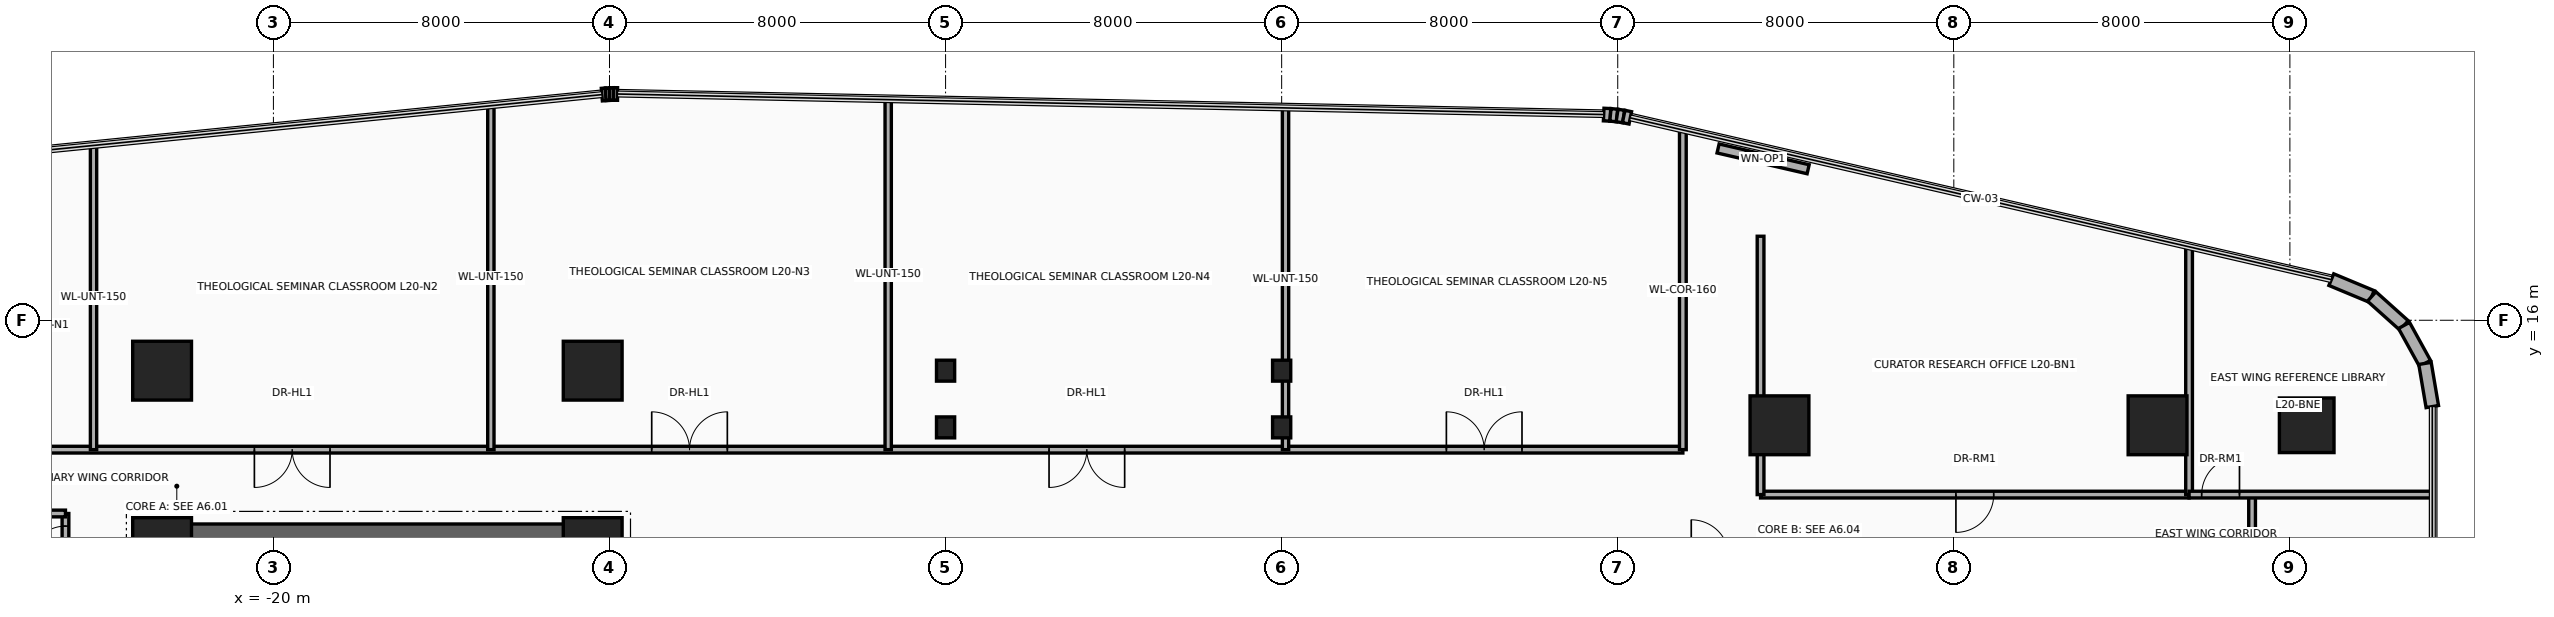
"""IFC4 building model, lengths in metres.
Left out: names, types, materials, properties, quantities, classifications, styles, units other than length and angle.
Written with IfcOpenShell. Run it as: python <this file> out.ifc"""

import sys

from ifc_helpers import new_model, si_unit, direction, frame, frame_2d, origin, origin_2d, place, context, subcontext, project, spatial, rectangle, circle, i_section, extrude, source, transform, mapped, element, fill, save


model = new_model("IFC4")
c1 = context("Model", 3, precision=1e-05, world=origin(), true_north=direction((0.0, 1.0)))
c2 = subcontext(c1, "Body", "Model", "MODEL_VIEW")
j1 = project(units=[si_unit("LENGTHUNIT", "METRE"), si_unit("PLANEANGLEUNIT", "RADIAN")], contexts=[c1])
p1 = place(None, origin())
s1 = spatial("IfcSite", under=j1, at=p1, CompositionType="ELEMENT")
p2 = place(p1, origin())
s2 = spatial("IfcBuilding", under=s1, at=p2, CompositionType="ELEMENT")
p3 = place(p2, frame((0.0, 0.0, 81.5)))
s3 = spatial("IfcBuildingStorey", under=s2, at=p3, CompositionType="ELEMENT", Elevation=81.5)
p4 = place(p3, frame((-22.65, -11.15, 0.0), z_axis=(0.0, 0.0, 1.0), x_axis=(0.0, 1.0, 0.0)))
e1 = element("IfcWall", 1, at=p4, inside=s3, PredefinedType="SHEAR", context=c2, shape_type="SweptSolid", body=[
    extrude(rectangle(XDim=22.3, YDim=0.7, at=frame_2d((11.15, 0.0))), origin(), (0.0, 0.0, 1.0), 3.46),
])
p5 = place(p3, frame((-22.65, 10.8, 0.0), z_axis=(0.0, 0.0, 1.0), x_axis=(1.0, 0.0, 0.0)))
e2 = element("IfcWall", 2, at=p5, inside=s3, PredefinedType="SHEAR", context=c2, shape_type="SweptSolid", body=[
    extrude(rectangle(XDim=10.25, YDim=0.7, at=frame_2d((5.125, 0.0))), origin(), (0.0, 0.0, 1.0), 3.46),
])
m1 = source(origin(), c2, "Body", "SweptSolid", [
    extrude(rectangle(XDim=1.4, YDim=1.4, at=origin_2d()), origin(), (0.0, 0.0, 1.0), 3.7),
])
for number, where, z_axis, x_axis in (
    (3, (-22.65, 10.6, 0.0), (0.0, 0.0, 1.0), (1.0, 0.0, 0.0)),
    (4, (-12.4, 10.6, 0.0), (0.0, 0.0, 1.0), (1.0, 0.0, 0.0)),
    (5, (-22.65, 14.8, 0.0), (0.0, 0.0, 1.0), (1.0, 0.0, 0.0)),
    (6, (-12.4, 14.8, 0.0), (0.0, 0.0, 1.0), (1.0, 0.0, 0.0)),
    (7, (15.85, 13.5, 0.0), (0.0, 0.0, 1.0), (1.0, 0.0, 0.0)),
    (8, (24.85, 13.5, 0.0), (0.0, 0.0, 1.0), (1.0, 0.0, 0.0)),
):
    element("IfcColumn", number, at=place(p3, frame(where, z_axis=z_axis, x_axis=x_axis)), inside=s3, PredefinedType="COLUMN", context=c2, shape_type="MappedRepresentation", body=[
        mapped(m1, transform((0.0, 0.0, 0.0), x_axis=(1.0, 0.0, 0.0), y_axis=(0.0, 1.0, 0.0), z_axis=(0.0, 0.0, 1.0), scale=1.0)),
    ])
m2 = source(origin(), c2, "Body", "SweptSolid", [
    extrude(circle(Radius=0.65, at=origin_2d()), origin(), (0.0, 0.0, 1.0), 3.7),
])
p6 = place(p3, frame((28.4, 13.5, 0.0), z_axis=(0.0, 0.0, 1.0), x_axis=(1.0, 0.0, 0.0)))
e9 = element("IfcColumn", 9, at=p6, inside=s3, PredefinedType="COLUMN", context=c2, shape_type="MappedRepresentation", body=[
    mapped(m2, transform((0.0, 0.0, 0.0), x_axis=(1.0, 0.0, 0.0), y_axis=(0.0, 1.0, 0.0), z_axis=(0.0, 0.0, 1.0), scale=1.0)),
])
m3 = source(origin(), c2, "Body", "SweptSolid", [
    extrude(i_section(OverallWidth=0.432, OverallDepth=0.498, WebThickness=0.056, FlangeThickness=0.089, at=origin_2d()), origin(), (0.0, 0.0, 1.0), 3.7),
])
for number, where, z_axis, x_axis in (
    (10, (-4.0, 13.45, 0.0), (0.0, 0.0, 1.0), (1.0, 0.0, 0.0)),
    (11, (-4.0, 14.8, 0.0), (0.0, 0.0, 1.0), (1.0, 0.0, 0.0)),
    (12, (4.0, 13.45, 0.0), (0.0, 0.0, 1.0), (1.0, 0.0, 0.0)),
    (13, (4.0, 14.8, 0.0), (0.0, 0.0, 1.0), (1.0, 0.0, 0.0)),
):
    element("IfcColumn", number, at=place(p3, frame(where, z_axis=z_axis, x_axis=x_axis)), inside=s3, PredefinedType="COLUMN", context=c2, shape_type="MappedRepresentation", body=[
        mapped(m3, transform((0.0, 0.0, 0.0), x_axis=(1.0, 0.0, 0.0), y_axis=(0.0, 1.0, 0.0), z_axis=(0.0, 0.0, 1.0), scale=1.0)),
    ])
p7 = place(p3, frame((-12.182, 21.371, 0.0), z_axis=(0.0, 0.0, 1.0), x_axis=(0.996527790842, 0.08326080759, 0.0)))
e14 = element("IfcWall", 14, at=p7, inside=s3, PredefinedType="SOLIDWALL", context=c2, shape_type="SweptSolid", body=[
    extrude(rectangle(XDim=0.094, YDim=0.3, at=frame_2d((0.047, 0.0))), origin(), (0.0, 0.0, 1.0), 3.46),
])
p8 = place(p3, frame((-12.088, 21.379, 0.0), z_axis=(0.0, 0.0, 1.0), x_axis=(0.998476480444, 0.055178963393, 0.0)))
e15 = element("IfcWall", 15, at=p8, inside=s3, PredefinedType="SOLIDWALL", context=c2, shape_type="SweptSolid", body=[
    extrude(rectangle(XDim=0.093, YDim=0.3, at=frame_2d((0.046, 0.0))), origin(), (0.0, 0.0, 1.0), 3.46),
])
p9 = place(p3, frame((-11.996, 21.384, 0.0), z_axis=(0.0, 0.0, 1.0), x_axis=(0.999722573757, 0.023553673204, 0.0)))
e16 = element("IfcWall", 16, at=p9, inside=s3, PredefinedType="SOLIDWALL", context=c2, shape_type="SweptSolid", body=[
    extrude(rectangle(XDim=0.093, YDim=0.3, at=frame_2d((0.047, 0.0))), origin(), (0.0, 0.0, 1.0), 3.46),
])
p10 = place(p3, frame((-11.902, 21.386, 0.0), z_axis=(0.0, 0.0, 1.0), x_axis=(0.999986507273, -0.005194735103, 0.0)))
e17 = element("IfcWall", 17, at=p10, inside=s3, PredefinedType="SOLIDWALL", context=c2, shape_type="SweptSolid", body=[
    extrude(rectangle(XDim=0.094, YDim=0.3, at=frame_2d((0.047, 0.0))), origin(), (0.0, 0.0, 1.0), 3.46),
])
p11 = place(p3, frame((11.666, 20.897, 0.0), z_axis=(0.0, 0.0, 1.0), x_axis=(0.998885297239, -0.047203421059, 0.0)))
e18 = element("IfcWall", 18, at=p11, inside=s3, PredefinedType="SOLIDWALL", context=c2, shape_type="SweptSolid", body=[
    extrude(rectangle(XDim=0.16, YDim=0.3, at=frame_2d((0.08, 0.0))), origin(), (0.0, 0.0, 1.0), 3.46),
])
p12 = place(p3, frame((11.826, 20.889, 0.0), z_axis=(0.0, 0.0, 1.0), x_axis=(0.995172891136, -0.098137234257, 0.0)))
e19 = element("IfcWall", 19, at=p12, inside=s3, PredefinedType="SOLIDWALL", context=c2, shape_type="SweptSolid", body=[
    extrude(rectangle(XDim=0.159, YDim=0.3, at=frame_2d((0.08, 0.0))), origin(), (0.0, 0.0, 1.0), 3.46),
])
p13 = place(p3, frame((11.984, 20.874, 0.0), z_axis=(0.0, 0.0, 1.0), x_axis=(0.988846069207, -0.148941100486, 0.0)))
e20 = element("IfcWall", 20, at=p13, inside=s3, PredefinedType="SOLIDWALL", context=c2, shape_type="SweptSolid", body=[
    extrude(rectangle(XDim=0.159, YDim=0.3, at=frame_2d((0.08, 0.0))), origin(), (0.0, 0.0, 1.0), 3.46),
])
p14 = place(p3, frame((12.142, 20.85, 0.0), z_axis=(0.0, 0.0, 1.0), x_axis=(0.979991950448, -0.19903712482, 0.0)))
e21 = element("IfcWall", 21, at=p14, inside=s3, PredefinedType="SOLIDWALL", context=c2, shape_type="SweptSolid", body=[
    extrude(rectangle(XDim=0.161, YDim=0.3, at=frame_2d((0.08, 0.0))), origin(), (0.0, 0.0, 1.0), 3.46),
])
p15 = place(p3, frame((14.389, 20.09, 0.0), z_axis=(0.0, 0.0, 1.0), x_axis=(0.974400545997, -0.224818984875, 0.0)))
e22 = element("IfcWall", 22, at=p15, inside=s3, PredefinedType="SOLIDWALL", context=c2, shape_type="SweptSolid", body=[
    extrude(rectangle(XDim=2.2, YDim=0.22, at=frame_2d((1.1, 0.0))), origin(), (0.0, 0.0, 1.0), 3.46),
])
p16 = place(p15, frame((0.65, 0.0, 0.95)))
e23 = element("IfcOpeningElement", 23, at=p16, cuts=e22, PredefinedType="OPENING", context=c2, shape_type="SweptSolid", body=[
    extrude(rectangle(XDim=0.9, YDim=1.3, at=frame_2d((0.45, 0.65))), frame((0.0, 0.125, 0.0), z_axis=(0.0, -1.0, 0.0), x_axis=(1.0, 0.0, 0.0)), (0.0, 0.0, 1.0), 0.25),
])
p17 = place(p3, frame((28.986, 16.967, 0.0), z_axis=(0.0, 0.0, 1.0), x_axis=(0.923083852684, -0.384598753136, 0.0)))
e24 = element("IfcWall", 24, at=p17, inside=s3, PredefinedType="SOLIDWALL", context=c2, shape_type="SweptSolid", body=[
    extrude(rectangle(XDim=1.042, YDim=0.3, at=frame_2d((0.521, 0.0))), origin(), (0.0, 0.0, 1.0), 3.46),
])
p18 = place(p3, frame((29.948, 16.566, 0.0), z_axis=(0.0, 0.0, 1.0), x_axis=(0.744585645533, -0.66752694063, 0.0)))
e25 = element("IfcWall", 25, at=p18, inside=s3, PredefinedType="SOLIDWALL", context=c2, shape_type="SweptSolid", body=[
    extrude(rectangle(XDim=1.033, YDim=0.3, at=frame_2d((0.517, 0.0))), origin(), (0.0, 0.0, 1.0), 3.46),
])
p19 = place(p3, frame((30.717, 15.877, 0.0), z_axis=(0.0, 0.0, 1.0), x_axis=(0.482971098131, -0.875636293429, 0.0)))
e26 = element("IfcWall", 26, at=p19, inside=s3, PredefinedType="SOLIDWALL", context=c2, shape_type="SweptSolid", body=[
    extrude(rectangle(XDim=1.033, YDim=0.3, at=frame_2d((0.516, 0.0))), origin(), (0.0, 0.0, 1.0), 3.46),
])
p20 = place(p3, frame((31.216, 14.973, 0.0), z_axis=(0.0, 0.0, 1.0), x_axis=(0.167019462117, -0.985953598946, 0.0)))
e27 = element("IfcWall", 27, at=p20, inside=s3, PredefinedType="SOLIDWALL", context=c2, shape_type="SweptSolid", body=[
    extrude(rectangle(XDim=1.042, YDim=0.3, at=frame_2d((0.521, 0.0))), origin(), (0.0, 0.0, 1.0), 3.46),
])
p21 = place(p3, frame((-24.95, 8.8, 0.0), z_axis=(0.0, 0.0, 1.0), x_axis=(0.0, 1.0, 0.0)))
e28 = element("IfcWall", 28, at=p21, inside=s3, PredefinedType="PARTITIONING", context=c2, shape_type="SweptSolid", body=[
    extrude(rectangle(XDim=2.6, YDim=0.16, at=frame_2d((1.3, 0.0))), origin(), (0.0, 0.0, 1.0), 2.583),
])
p22 = place(p21, frame((0.3, 0.0, 0.0)))
e29 = element("IfcOpeningElement", 29, at=p22, cuts=e28, PredefinedType="OPENING", context=c2, shape_type="SweptSolid", body=[
    extrude(rectangle(XDim=0.85, YDim=2.1, at=frame_2d((0.425, 1.05))), frame((0.0, 0.095, 0.0), z_axis=(0.0, -1.0, 0.0), x_axis=(1.0, 0.0, 0.0)), (0.0, 0.0, 1.0), 0.19),
])
p23 = place(p21, frame((1.45, 0.0, 0.0)))
e30 = element("IfcOpeningElement", 30, at=p23, cuts=e28, PredefinedType="OPENING", context=c2, shape_type="SweptSolid", body=[
    extrude(rectangle(XDim=0.85, YDim=2.1, at=frame_2d((0.425, 1.05))), frame((0.0, 0.095, 0.0), z_axis=(0.0, -1.0, 0.0), x_axis=(1.0, 0.0, 0.0)), (0.0, 0.0, 1.0), 0.19),
])
p24 = place(p3, frame((-28.25, 11.4, 0.0), z_axis=(0.0, 0.0, 1.0), x_axis=(1.0, 0.0, 0.0)))
e31 = element("IfcWall", 31, at=p24, inside=s3, PredefinedType="PARTITIONING", context=c2, shape_type="SweptSolid", body=[
    extrude(rectangle(XDim=3.3, YDim=0.16, at=frame_2d((1.65, 0.0))), origin(), (0.0, 0.0, 1.0), 3.46),
])
p25 = place(p3, frame((-33.54, 12.92, 0.0), z_axis=(0.0, 0.0, 1.0), x_axis=(1.0, 0.0, 0.0)))
e32 = element("IfcWall", 32, at=p25, inside=s3, PredefinedType="PARTITIONING", context=c2, shape_type="SweptSolid", body=[
    extrude(rectangle(XDim=47.09, YDim=0.16, at=frame_2d((23.545, 0.0))), origin(), (0.0, 0.0, 1.0), 2.583),
])
p26 = place(p25, frame((4.48, 0.0, 0.0)))
e33 = element("IfcOpeningElement", 33, at=p26, cuts=e32, PredefinedType="OPENING", context=c2, shape_type="SweptSolid", body=[
    extrude(rectangle(XDim=1.8, YDim=2.15, at=frame_2d((0.9, 1.075))), frame((0.0, 0.095, 0.0), z_axis=(0.0, -1.0, 0.0), x_axis=(1.0, 0.0, 0.0)), (0.0, 0.0, 1.0), 0.19),
])
p27 = place(p25, frame((13.087, 0.0, 0.0)))
e34 = element("IfcOpeningElement", 34, at=p27, cuts=e32, PredefinedType="OPENING", context=c2, shape_type="SweptSolid", body=[
    extrude(rectangle(XDim=1.8, YDim=2.15, at=frame_2d((0.9, 1.075))), frame((0.0, 0.095, 0.0), z_axis=(0.0, -1.0, 0.0), x_axis=(1.0, 0.0, 0.0)), (0.0, 0.0, 1.0), 0.19),
])
p28 = place(p25, frame((22.545, 0.0, 0.0)))
e35 = element("IfcOpeningElement", 35, at=p28, cuts=e32, PredefinedType="OPENING", context=c2, shape_type="SweptSolid", body=[
    extrude(rectangle(XDim=1.8, YDim=2.15, at=frame_2d((0.9, 1.075))), frame((0.0, 0.095, 0.0), z_axis=(0.0, -1.0, 0.0), x_axis=(1.0, 0.0, 0.0)), (0.0, 0.0, 1.0), 0.19),
])
p29 = place(p25, frame((32.003, 0.0, 0.0)))
e36 = element("IfcOpeningElement", 36, at=p29, cuts=e32, PredefinedType="OPENING", context=c2, shape_type="SweptSolid", body=[
    extrude(rectangle(XDim=1.8, YDim=2.15, at=frame_2d((0.9, 1.075))), frame((0.0, 0.095, 0.0), z_axis=(0.0, -1.0, 0.0), x_axis=(1.0, 0.0, 0.0)), (0.0, 0.0, 1.0), 0.19),
])
p30 = place(p25, frame((41.461, 0.0, 0.0)))
e37 = element("IfcOpeningElement", 37, at=p30, cuts=e32, PredefinedType="OPENING", context=c2, shape_type="SweptSolid", body=[
    extrude(rectangle(XDim=1.8, YDim=2.15, at=frame_2d((0.9, 1.075))), frame((0.0, 0.095, 0.0), z_axis=(0.0, -1.0, 0.0), x_axis=(1.0, 0.0, 0.0)), (0.0, 0.0, 1.0), 0.19),
])
p31 = place(p3, frame((13.55, 12.92, 0.0), z_axis=(0.0, 0.0, 1.0), x_axis=(0.0, 1.0, 0.0)))
e38 = element("IfcWall", 38, at=p31, inside=s3, PredefinedType="PARTITIONING", context=c2, shape_type="SweptSolid", body=[
    extrude(rectangle(XDim=7.609, YDim=0.16, at=frame_2d((3.805, 0.0))), origin(), (0.0, 0.0, 1.0), 2.583),
])
p32 = place(p3, frame((-24.282, 12.92, 0.0), z_axis=(0.0, 0.0, 1.0), x_axis=(0.0, 1.0, 0.0)))
e39 = element("IfcWall", 39, at=p32, inside=s3, PredefinedType="PARTITIONING", context=c2, shape_type="SweptSolid", body=[
    extrude(rectangle(XDim=7.241, YDim=0.15, at=frame_2d((3.621, 0.0))), origin(), (0.0, 0.0, 1.0), 2.583),
])
p33 = place(p3, frame((-14.824, 12.92, 0.0), z_axis=(0.0, 0.0, 1.0), x_axis=(0.0, 1.0, 0.0)))
e40 = element("IfcWall", 40, at=p33, inside=s3, PredefinedType="PARTITIONING", context=c2, shape_type="SweptSolid", body=[
    extrude(rectangle(XDim=8.187, YDim=0.15, at=frame_2d((4.094, 0.0))), origin(), (0.0, 0.0, 1.0), 2.583),
])
p34 = place(p3, frame((-5.366, 12.92, 0.0), z_axis=(0.0, 0.0, 1.0), x_axis=(0.0, 1.0, 0.0)))
e41 = element("IfcWall", 41, at=p34, inside=s3, PredefinedType="PARTITIONING", context=c2, shape_type="SweptSolid", body=[
    extrude(rectangle(XDim=8.332, YDim=0.15, at=frame_2d((4.166, 0.0))), origin(), (0.0, 0.0, 1.0), 2.583),
])
p35 = place(p3, frame((4.092, 12.92, 0.0), z_axis=(0.0, 0.0, 1.0), x_axis=(0.0, 1.0, 0.0)))
e42 = element("IfcWall", 42, at=p35, inside=s3, PredefinedType="PARTITIONING", context=c2, shape_type="SweptSolid", body=[
    extrude(rectangle(XDim=8.135, YDim=0.15, at=frame_2d((4.067, 0.0))), origin(), (0.0, 0.0, 1.0), 2.583),
])
p36 = place(p3, frame((15.4, 11.85, 0.0), z_axis=(0.0, 0.0, 1.0), x_axis=(1.0, 0.0, 0.0)))
e43 = element("IfcWall", 43, at=p36, inside=s3, PredefinedType="PARTITIONING", context=c2, shape_type="SweptSolid", body=[
    extrude(rectangle(XDim=10.2, YDim=0.16, at=frame_2d((5.1, 0.0))), origin(), (0.0, 0.0, 1.0), 2.834),
])
p37 = place(p36, frame((4.65, 0.0, 0.0)))
e44 = element("IfcOpeningElement", 44, at=p37, cuts=e43, PredefinedType="OPENING", context=c2, shape_type="SweptSolid", body=[
    extrude(rectangle(XDim=0.9, YDim=2.1, at=frame_2d((0.45, 1.05))), frame((0.0, 0.095, 0.0), z_axis=(0.0, -1.0, 0.0), x_axis=(1.0, 0.0, 0.0)), (0.0, 0.0, 1.0), 0.19),
])
p38 = place(p3, frame((15.4, 11.85, 0.0), z_axis=(0.0, 0.0, 1.0), x_axis=(0.0, 1.0, 0.0)))
e45 = element("IfcWall", 45, at=p38, inside=s3, PredefinedType="PARTITIONING", context=c2, shape_type="SweptSolid", body=[
    extrude(rectangle(XDim=6.15, YDim=0.16, at=frame_2d((3.075, 0.0))), origin(), (0.0, 0.0, 1.0), 2.583),
])
p39 = place(p3, frame((25.6, 11.85, 0.0), z_axis=(0.0, 0.0, 1.0), x_axis=(0.0, 1.0, 0.0)))
e46 = element("IfcWall", 46, at=p39, inside=s3, PredefinedType="PARTITIONING", context=c2, shape_type="SweptSolid", body=[
    extrude(rectangle(XDim=5.898, YDim=0.16, at=frame_2d((2.949, 0.0))), origin(), (0.0, 0.0, 1.0), 2.583),
])
p40 = place(p3, frame((27.1, -13.89, 0.0), z_axis=(0.0, 0.0, 1.0), x_axis=(0.0, 1.0, 0.0)))
e47 = element("IfcWall", 47, at=p40, inside=s3, PredefinedType="PARTITIONING", context=c2, shape_type="SweptSolid", body=[
    extrude(rectangle(XDim=25.74, YDim=0.16, at=frame_2d((12.87, 0.0))), origin(), (0.0, 0.0, 1.0), 2.583),
])
p41 = place(p40, frame((1.76, 0.0, 0.0)))
e48 = element("IfcOpeningElement", 48, at=p41, cuts=e47, PredefinedType="OPENING", context=c2, shape_type="SweptSolid", body=[
    extrude(rectangle(XDim=1.8, YDim=2.15, at=frame_2d((0.9, 1.075))), frame((0.0, 0.095, 0.0), z_axis=(0.0, -1.0, 0.0), x_axis=(1.0, 0.0, 0.0)), (0.0, 0.0, 1.0), 0.19),
])
p42 = place(p40, frame((12.16, 0.0, 0.0)))
e49 = element("IfcOpeningElement", 49, at=p42, cuts=e47, PredefinedType="OPENING", context=c2, shape_type="SweptSolid", body=[
    extrude(rectangle(XDim=1.8, YDim=2.15, at=frame_2d((0.9, 1.075))), frame((0.0, 0.095, 0.0), z_axis=(0.0, -1.0, 0.0), x_axis=(1.0, 0.0, 0.0)), (0.0, 0.0, 1.0), 0.19),
])
p43 = place(p40, frame((20.365, 0.0, 0.0)))
e50 = element("IfcOpeningElement", 50, at=p43, cuts=e47, PredefinedType="OPENING", context=c2, shape_type="SweptSolid", body=[
    extrude(rectangle(XDim=1.8, YDim=2.15, at=frame_2d((0.9, 1.075))), frame((0.0, 0.095, 0.0), z_axis=(0.0, -1.0, 0.0), x_axis=(1.0, 0.0, 0.0)), (0.0, 0.0, 1.0), 0.19),
])
p44 = place(p3, frame((25.6, 11.85, 0.0), z_axis=(0.0, 0.0, 1.0), x_axis=(1.0, 0.0, 0.0)))
e51 = element("IfcWall", 51, at=p44, inside=s3, PredefinedType="PARTITIONING", context=c2, shape_type="SweptSolid", body=[
    extrude(rectangle(XDim=5.79, YDim=0.16, at=frame_2d((2.895, 0.0))), origin(), (0.0, 0.0, 1.0), 2.896),
])
p45 = place(p44, frame((0.3, 0.0, 0.0)))
e52 = element("IfcOpeningElement", 52, at=p45, cuts=e51, PredefinedType="OPENING", context=c2, shape_type="SweptSolid", body=[
    extrude(rectangle(XDim=0.9, YDim=2.1, at=frame_2d((0.45, 1.05))), frame((0.0, 0.095, 0.0), z_axis=(0.0, -1.0, 0.0), x_axis=(1.0, 0.0, 0.0)), (0.0, 0.0, 1.0), 0.19),
])
p46 = place(p16, origin())
e53 = element("IfcWindow", 53, at=p46, inside=s3, PartitioningType="SINGLE_PANEL", PredefinedType="WINDOW", context=c2, shape_type="SweptSolid", body=[
    extrude(rectangle(XDim=0.9, YDim=1.3, at=frame_2d((0.45, 0.65))), frame((0.0, 0.03, 0.0), z_axis=(0.0, -1.0, 0.0), x_axis=(1.0, 0.0, 0.0)), (0.0, 0.0, 1.0), 0.06),
])
fill(e23, e53)
p47 = place(p23, origin())
e54 = element("IfcDoor", 54, at=p47, inside=s3, OperationType="SINGLE_SWING_RIGHT", PredefinedType="DOOR", context=c2, shape_type="SweptSolid", body=[
    extrude(rectangle(XDim=0.85, YDim=2.1, at=frame_2d((0.425, 1.05))), frame((0.0, 0.025, 0.0), z_axis=(0.0, -1.0, 0.0), x_axis=(1.0, 0.0, 0.0)), (0.0, 0.0, 1.0), 0.05),
])
fill(e30, e54)
p48 = place(p27, frame((1.8, 0.0, 0.0), z_axis=(0.0, 0.0, 1.0), x_axis=(-1.0, 0.0, 0.0)))
e55 = element("IfcDoor", 55, at=p48, inside=s3, OperationType="DOUBLE_DOOR_SINGLE_SWING", PredefinedType="DOOR", context=c2, shape_type="SweptSolid", body=[
    extrude(rectangle(XDim=1.8, YDim=2.15, at=frame_2d((0.9, 1.075))), frame((0.0, 0.025, 0.0), z_axis=(0.0, -1.0, 0.0), x_axis=(1.0, 0.0, 0.0)), (0.0, 0.0, 1.0), 0.05),
])
fill(e34, e55)
p49 = place(p28, origin())
e56 = element("IfcDoor", 56, at=p49, inside=s3, OperationType="DOUBLE_DOOR_SINGLE_SWING", PredefinedType="DOOR", context=c2, shape_type="SweptSolid", body=[
    extrude(rectangle(XDim=1.8, YDim=2.15, at=frame_2d((0.9, 1.075))), frame((0.0, 0.025, 0.0), z_axis=(0.0, -1.0, 0.0), x_axis=(1.0, 0.0, 0.0)), (0.0, 0.0, 1.0), 0.05),
])
fill(e35, e56)
p50 = place(p29, frame((1.8, 0.0, 0.0), z_axis=(0.0, 0.0, 1.0), x_axis=(-1.0, 0.0, 0.0)))
e57 = element("IfcDoor", 57, at=p50, inside=s3, OperationType="DOUBLE_DOOR_SINGLE_SWING", PredefinedType="DOOR", context=c2, shape_type="SweptSolid", body=[
    extrude(rectangle(XDim=1.8, YDim=2.15, at=frame_2d((0.9, 1.075))), frame((0.0, 0.025, 0.0), z_axis=(0.0, -1.0, 0.0), x_axis=(1.0, 0.0, 0.0)), (0.0, 0.0, 1.0), 0.05),
])
fill(e36, e57)
p51 = place(p30, origin())
e58 = element("IfcDoor", 58, at=p51, inside=s3, OperationType="DOUBLE_DOOR_SINGLE_SWING", PredefinedType="DOOR", context=c2, shape_type="SweptSolid", body=[
    extrude(rectangle(XDim=1.8, YDim=2.15, at=frame_2d((0.9, 1.075))), frame((0.0, 0.025, 0.0), z_axis=(0.0, -1.0, 0.0), x_axis=(1.0, 0.0, 0.0)), (0.0, 0.0, 1.0), 0.05),
])
fill(e37, e58)
p52 = place(p37, frame((0.9, 0.0, 0.0), z_axis=(0.0, 0.0, 1.0), x_axis=(-1.0, 0.0, 0.0)))
e59 = element("IfcDoor", 59, at=p52, inside=s3, OperationType="SINGLE_SWING_LEFT", PredefinedType="DOOR", context=c2, shape_type="SweptSolid", body=[
    extrude(rectangle(XDim=0.9, YDim=2.1, at=frame_2d((0.45, 1.05))), frame((0.0, 0.025, 0.0), z_axis=(0.0, -1.0, 0.0), x_axis=(1.0, 0.0, 0.0)), (0.0, 0.0, 1.0), 0.05),
])
fill(e44, e59)
p53 = place(p45, origin())
e60 = element("IfcDoor", 60, at=p53, inside=s3, OperationType="SINGLE_SWING_LEFT", PredefinedType="DOOR", context=c2, shape_type="SweptSolid", body=[
    extrude(rectangle(XDim=0.9, YDim=2.1, at=frame_2d((0.45, 1.05))), frame((0.0, 0.025, 0.0), z_axis=(0.0, -1.0, 0.0), x_axis=(1.0, 0.0, 0.0)), (0.0, 0.0, 1.0), 0.05),
])
fill(e52, e60)
save(model, sys.argv[1])
